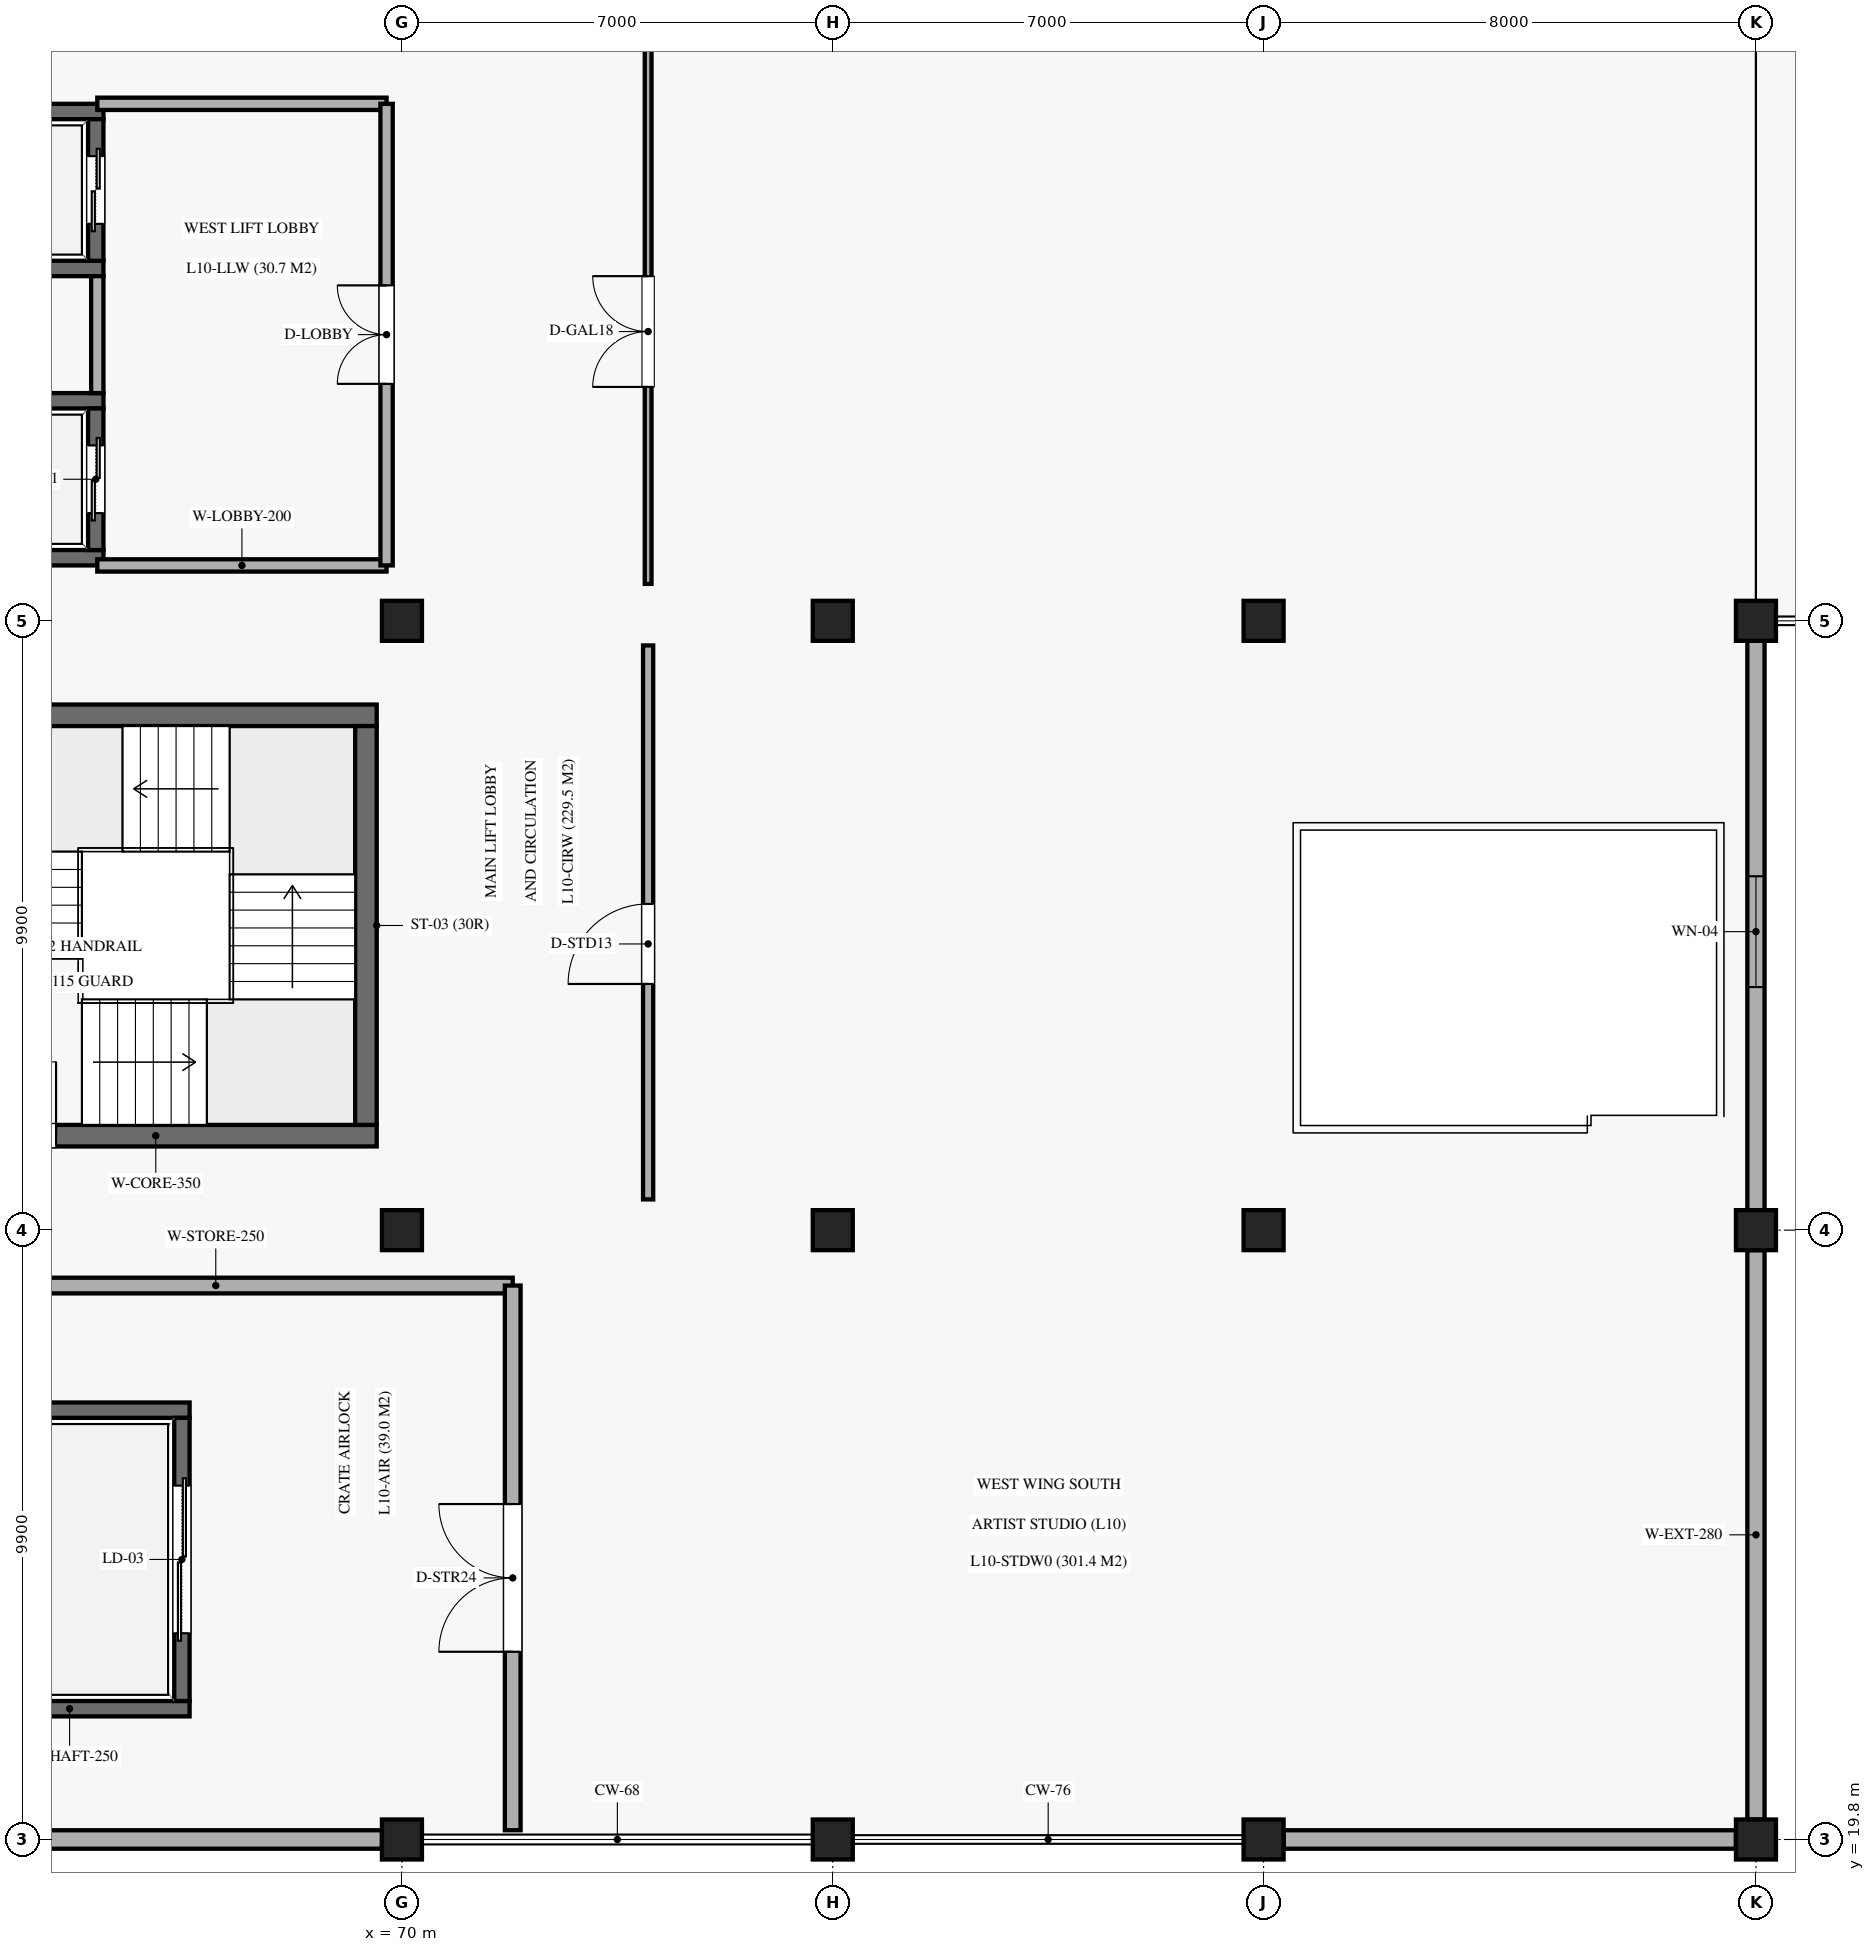
"""IFC4 building model, lengths in metres.
Left out: names, types, materials, properties, quantities, classifications, styles, units other than length and angle.
Written with IfcOpenShell. Run it as: python <this file> out.ifc"""

import sys

from ifc_helpers import new_model, si_unit, direction, frame, frame_2d, origin, origin_2d, place, context, subcontext, project, spatial, rectangle, extrude, element, fill, save


model = new_model("IFC4")
c1 = context("Model", 3, precision=1e-05, world=origin(), true_north=direction((0.0, 1.0)))
c2 = subcontext(c1, "Body", "Model", "MODEL_VIEW")
j1 = project(units=[si_unit("LENGTHUNIT", "METRE"), si_unit("PLANEANGLEUNIT", "RADIAN")], contexts=[c1])
p1 = place(None, origin())
s1 = spatial("IfcSite", under=j1, at=p1, CompositionType="ELEMENT")
p2 = place(p1, origin())
s2 = spatial("IfcBuilding", under=s1, at=p2, CompositionType="ELEMENT")
p3 = place(p2, frame((0.0, 0.0, 52.02)))
s3 = spatial("IfcBuildingStorey", under=s2, at=p3, CompositionType="ELEMENT", Elevation=52.02)
for number, where, z_axis, x_axis in (
    (1, (70.0, 19.8, 0.0), (0.0, 0.0, 1.0), (1.0, 0.0, 0.0)),
    (2, (70.0, 29.7, 0.0), (0.0, 0.0, 1.0), (1.0, 0.0, 0.0)),
    (3, (70.0, 39.6, 0.0), (0.0, 0.0, 1.0), (1.0, 0.0, 0.0)),
    (4, (77.0, 19.8, 0.0), (0.0, 0.0, 1.0), (1.0, 0.0, 0.0)),
    (5, (77.0, 29.7, 0.0), (0.0, 0.0, 1.0), (1.0, 0.0, 0.0)),
    (6, (77.0, 39.6, 0.0), (0.0, 0.0, 1.0), (1.0, 0.0, 0.0)),
    (7, (84.0, 19.8, 0.0), (0.0, 0.0, 1.0), (1.0, 0.0, 0.0)),
    (8, (84.0, 29.7, 0.0), (0.0, 0.0, 1.0), (1.0, 0.0, 0.0)),
    (9, (84.0, 39.6, 0.0), (0.0, 0.0, 1.0), (1.0, 0.0, 0.0)),
    (10, (92.0, 19.8, 0.0), (0.0, 0.0, 1.0), (1.0, 0.0, 0.0)),
    (11, (92.0, 29.7, 0.0), (0.0, 0.0, 1.0), (1.0, 0.0, 0.0)),
    (12, (92.0, 39.6, 0.0), (0.0, 0.0, 1.0), (1.0, 0.0, 0.0)),
):
    element("IfcColumn", number, at=place(p3, frame(where, z_axis=z_axis, x_axis=x_axis)), inside=s3, PredefinedType="COLUMN", context=c2, shape_type="SweptSolid", body=[
        extrude(rectangle(XDim=0.65, YDim=0.65, at=origin_2d()), origin(), (0.0, 0.0, 1.0), 5.1),
    ])
p4 = place(p3, frame((92.0, 20.125, 0.0), z_axis=(0.0, 0.0, 1.0), x_axis=(0.0, 1.0, 0.0)))
e13 = element("IfcWall", 13, at=p4, inside=s3, PredefinedType="SOLIDWALL", context=c2, shape_type="SweptSolid", body=[
    extrude(rectangle(XDim=9.25, YDim=0.28, at=frame_2d((4.625, 0.0))), origin(), (0.0, 0.0, 1.0), 4.1),
])
p5 = place(p3, frame((92.0, 30.025, 0.0), z_axis=(0.0, 0.0, 1.0), x_axis=(0.0, 1.0, 0.0)))
e14 = element("IfcWall", 14, at=p5, inside=s3, PredefinedType="SOLIDWALL", context=c2, shape_type="SweptSolid", body=[
    extrude(rectangle(XDim=9.25, YDim=0.28, at=frame_2d((4.625, 0.0))), origin(), (0.0, 0.0, 1.0), 4.1),
])
p6 = place(p5, frame((3.625, 0.0, 1.45)))
e15 = element("IfcOpeningElement", 15, at=p6, cuts=e14, PredefinedType="OPENING", context=c2, shape_type="SweptSolid", body=[
    extrude(rectangle(XDim=1.8, YDim=1.7, at=frame_2d((0.9, 0.85))), frame((0.0, 0.15, 0.0), z_axis=(0.0, -1.0, 0.0), x_axis=(1.0, 0.0, 0.0)), (0.0, 0.0, 1.0), 0.3),
])
for number, where, z_axis, x_axis in (
    (16, (62.325, 19.8, 0.0), (0.0, 0.0, 1.0), (1.0, 0.0, 0.0)),
    (17, (84.325, 19.8, 0.0), (0.0, 0.0, 1.0), (1.0, 0.0, 0.0)),
):
    element("IfcWall", number, at=place(p3, frame(where, z_axis=z_axis, x_axis=x_axis)), inside=s3, PredefinedType="SOLIDWALL", context=c2, shape_type="SweptSolid", body=[
        extrude(rectangle(XDim=7.35, YDim=0.3, at=frame_2d((3.675, 0.0))), origin(), (0.0, 0.0, 1.0), 4.1),
    ])
p7 = place(p3, frame((62.41, 31.235, 0.0), z_axis=(0.0, 0.0, 1.0), x_axis=(1.0, 0.0, 0.0)))
e18 = element("IfcWall", 18, at=p7, inside=s3, PredefinedType="SHEAR", context=c2, shape_type="SweptSolid", body=[
    extrude(rectangle(XDim=7.18, YDim=0.35, at=frame_2d((3.59, 0.0))), origin(), (0.0, 0.0, 1.0), 4.85),
])
p8 = place(p7, frame((0.77, 0.0, 0.0)))
e19 = element("IfcOpeningElement", 19, at=p8, cuts=e18, PredefinedType="OPENING", context=c2, shape_type="SweptSolid", body=[
    extrude(rectangle(XDim=1.2, YDim=2.2, at=frame_2d((0.6, 1.1))), frame((0.0, 0.185, 0.0), z_axis=(0.0, -1.0, 0.0), x_axis=(1.0, 0.0, 0.0)), (0.0, 0.0, 1.0), 0.37),
])
p9 = place(p3, frame((62.41, 38.065, 0.0), z_axis=(0.0, 0.0, 1.0), x_axis=(1.0, 0.0, 0.0)))
e20 = element("IfcWall", 20, at=p9, inside=s3, PredefinedType="SHEAR", context=c2, shape_type="SweptSolid", body=[
    extrude(rectangle(XDim=7.18, YDim=0.35, at=frame_2d((3.59, 0.0))), origin(), (0.0, 0.0, 1.0), 4.85),
])
p10 = place(p3, frame((69.415, 31.41, 0.0), z_axis=(0.0, 0.0, 1.0), x_axis=(0.0, 1.0, 0.0)))
e21 = element("IfcWall", 21, at=p10, inside=s3, PredefinedType="SHEAR", context=c2, shape_type="SweptSolid", body=[
    extrude(rectangle(XDim=6.48, YDim=0.35, at=frame_2d((3.24, 0.0))), origin(), (0.0, 0.0, 1.0), 4.85),
])
for number, where, z_axis, x_axis in (
    (22, (62.65, 40.625, 0.0), (0.0, 0.0, 1.0), (1.0, 0.0, 0.0)),
    (23, (62.65, 43.175, 0.0), (0.0, 0.0, 1.0), (1.0, 0.0, 0.0)),
):
    element("IfcWall", number, at=place(p3, frame(where, z_axis=z_axis, x_axis=x_axis)), inside=s3, PredefinedType="SOLIDWALL", context=c2, shape_type="SweptSolid", body=[
        extrude(rectangle(XDim=2.5, YDim=0.25, at=frame_2d((1.25, 0.0))), origin(), (0.0, 0.0, 1.0), 4.83),
    ])
p11 = place(p3, frame((65.025, 40.75, 0.0), z_axis=(0.0, 0.0, 1.0), x_axis=(0.0, 1.0, 0.0)))
e24 = element("IfcWall", 24, at=p11, inside=s3, PredefinedType="SOLIDWALL", context=c2, shape_type="SweptSolid", body=[
    extrude(rectangle(XDim=2.3, YDim=0.25, at=frame_2d((1.15, 0.0))), origin(), (0.0, 0.0, 1.0), 4.83),
])
p12 = place(p11, frame((0.6, 0.0, 0.0)))
e25 = element("IfcOpeningElement", 25, at=p12, cuts=e24, PredefinedType="OPENING", context=c2, shape_type="SweptSolid", body=[
    extrude(rectangle(XDim=1.1, YDim=2.2, at=frame_2d((0.55, 1.1))), frame((0.0, 0.135, 0.0), z_axis=(0.0, -1.0, 0.0), x_axis=(1.0, 0.0, 0.0)), (0.0, 0.0, 1.0), 0.27),
])
for number, where, z_axis, x_axis in (
    (26, (62.65, 45.325, 0.0), (0.0, 0.0, 1.0), (1.0, 0.0, 0.0)),
    (27, (62.65, 47.875, 0.0), (0.0, 0.0, 1.0), (1.0, 0.0, 0.0)),
):
    element("IfcWall", number, at=place(p3, frame(where, z_axis=z_axis, x_axis=x_axis)), inside=s3, PredefinedType="SOLIDWALL", context=c2, shape_type="SweptSolid", body=[
        extrude(rectangle(XDim=2.5, YDim=0.25, at=frame_2d((1.25, 0.0))), origin(), (0.0, 0.0, 1.0), 4.83),
    ])
p13 = place(p3, frame((65.025, 45.45, 0.0), z_axis=(0.0, 0.0, 1.0), x_axis=(0.0, 1.0, 0.0)))
e28 = element("IfcWall", 28, at=p13, inside=s3, PredefinedType="SOLIDWALL", context=c2, shape_type="SweptSolid", body=[
    extrude(rectangle(XDim=2.3, YDim=0.25, at=frame_2d((1.15, 0.0))), origin(), (0.0, 0.0, 1.0), 4.83),
])
p14 = place(p13, frame((0.6, 0.0, 0.0)))
e29 = element("IfcOpeningElement", 29, at=p14, cuts=e28, PredefinedType="OPENING", context=c2, shape_type="SweptSolid", body=[
    extrude(rectangle(XDim=1.1, YDim=2.2, at=frame_2d((0.55, 1.1))), frame((0.0, 0.135, 0.0), z_axis=(0.0, -1.0, 0.0), x_axis=(1.0, 0.0, 0.0)), (0.0, 0.0, 1.0), 0.27),
])
for number, where, z_axis, x_axis in (
    (30, (62.65, 21.925, 0.0), (0.0, 0.0, 1.0), (1.0, 0.0, 0.0)),
    (31, (62.65, 26.775, 0.0), (0.0, 0.0, 1.0), (1.0, 0.0, 0.0)),
):
    element("IfcWall", number, at=place(p3, frame(where, z_axis=z_axis, x_axis=x_axis)), inside=s3, PredefinedType="SOLIDWALL", context=c2, shape_type="SweptSolid", body=[
        extrude(rectangle(XDim=3.9, YDim=0.25, at=frame_2d((1.95, 0.0))), origin(), (0.0, 0.0, 1.0), 4.83),
    ])
p15 = place(p3, frame((66.425, 22.05, 0.0), z_axis=(0.0, 0.0, 1.0), x_axis=(0.0, 1.0, 0.0)))
e32 = element("IfcWall", 32, at=p15, inside=s3, PredefinedType="SOLIDWALL", context=c2, shape_type="SweptSolid", body=[
    extrude(rectangle(XDim=4.6, YDim=0.25, at=frame_2d((2.3, 0.0))), origin(), (0.0, 0.0, 1.0), 4.83),
])
p16 = place(p15, frame((1.1, 0.0, 0.0)))
e33 = element("IfcOpeningElement", 33, at=p16, cuts=e32, PredefinedType="OPENING", context=c2, shape_type="SweptSolid", body=[
    extrude(rectangle(XDim=2.4, YDim=2.65, at=frame_2d((1.2, 1.325))), frame((0.0, 0.135, 0.0), z_axis=(0.0, -1.0, 0.0), x_axis=(1.0, 0.0, 0.0)), (0.0, 0.0, 1.0), 0.27),
])
for number, where, z_axis, x_axis in (
    (34, (65.05, 40.5, 0.0), (0.0, 0.0, 1.0), (1.0, 0.0, 0.0)),
    (35, (65.05, 48.0, 0.0), (0.0, 0.0, 1.0), (1.0, 0.0, 0.0)),
):
    element("IfcWall", number, at=place(p3, frame(where, z_axis=z_axis, x_axis=x_axis)), inside=s3, PredefinedType="SOLIDWALL", context=c2, shape_type="SweptSolid", body=[
        extrude(rectangle(XDim=4.7, YDim=0.2, at=frame_2d((2.35, 0.0))), origin(), (0.0, 0.0, 1.0), 3.97),
    ])
p17 = place(p3, frame((65.05, 43.3, 0.0), z_axis=(0.0, 0.0, 1.0), x_axis=(0.0, 1.0, 0.0)))
e36 = element("IfcWall", 36, at=p17, inside=s3, PredefinedType="SOLIDWALL", context=c2, shape_type="SweptSolid", body=[
    extrude(rectangle(XDim=1.9, YDim=0.2, at=frame_2d((0.95, 0.0))), origin(), (0.0, 0.0, 1.0), 3.97),
])
p18 = place(p3, frame((69.75, 40.5, 0.0), z_axis=(0.0, 0.0, 1.0), x_axis=(0.0, 1.0, 0.0)))
e37 = element("IfcWall", 37, at=p18, inside=s3, PredefinedType="SOLIDWALL", context=c2, shape_type="SweptSolid", body=[
    extrude(rectangle(XDim=7.5, YDim=0.2, at=frame_2d((3.75, 0.0))), origin(), (0.0, 0.0, 1.0), 3.97),
])
p19 = place(p18, frame((2.95, 0.0, 0.0)))
e38 = element("IfcOpeningElement", 38, at=p19, cuts=e37, PredefinedType="OPENING", context=c2, shape_type="SweptSolid", body=[
    extrude(rectangle(XDim=1.6, YDim=2.2, at=frame_2d((0.8, 1.1))), frame((0.0, 0.11, 0.0), z_axis=(0.0, -1.0, 0.0), x_axis=(1.0, 0.0, 0.0)), (0.0, 0.0, 1.0), 0.22),
])
p20 = place(p3, frame((62.15, 28.8, 0.0), z_axis=(0.0, 0.0, 1.0), x_axis=(1.0, 0.0, 0.0)))
e39 = element("IfcWall", 39, at=p20, inside=s3, PredefinedType="SOLIDWALL", context=c2, shape_type="SweptSolid", body=[
    extrude(rectangle(XDim=9.65, YDim=0.255, at=frame_2d((4.825, 0.0))), origin(), (0.0, 0.0, 1.0), 3.97),
])
p21 = place(p3, frame((71.8, 19.95, 0.0), z_axis=(0.0, 0.0, 1.0), x_axis=(0.0, 1.0, 0.0)))
e40 = element("IfcWall", 40, at=p21, inside=s3, PredefinedType="SOLIDWALL", context=c2, shape_type="SweptSolid", body=[
    extrude(rectangle(XDim=8.85, YDim=0.255, at=frame_2d((4.425, 0.0))), origin(), (0.0, 0.0, 1.0), 3.97),
])
p22 = place(p21, frame((2.9, 0.0, 0.0)))
e41 = element("IfcOpeningElement", 41, at=p22, cuts=e40, PredefinedType="OPENING", context=c2, shape_type="SweptSolid", body=[
    extrude(rectangle(XDim=2.4, YDim=2.5, at=frame_2d((1.2, 1.25))), frame((0.0, 0.137, 0.0), z_axis=(0.0, -1.0, 0.0), x_axis=(1.0, 0.0, 0.0)), (0.0, 0.0, 1.0), 0.275),
])
p23 = place(p3, frame((74.0, 40.2, 0.0), z_axis=(0.0, 0.0, 1.0), x_axis=(0.0, 1.0, 0.0)))
e42 = element("IfcWall", 42, at=p23, inside=s3, PredefinedType="PARTITIONING", context=c2, shape_type="SweptSolid", body=[
    extrude(rectangle(XDim=22.3, YDim=0.11, at=frame_2d((11.15, 0.0))), origin(), (0.0, 0.0, 1.0), 3.97),
])
p24 = place(p23, frame((3.2, 0.0, 0.0)))
e43 = element("IfcOpeningElement", 43, at=p24, cuts=e42, PredefinedType="OPENING", context=c2, shape_type="SweptSolid", body=[
    extrude(rectangle(XDim=1.8, YDim=2.45, at=frame_2d((0.9, 1.225))), frame((0.0, 0.065, 0.0), z_axis=(0.0, -1.0, 0.0), x_axis=(1.0, 0.0, 0.0)), (0.0, 0.0, 1.0), 0.13),
])
p25 = place(p3, frame((74.0, 30.2, 0.0), z_axis=(0.0, 0.0, 1.0), x_axis=(0.0, 1.0, 0.0)))
e44 = element("IfcWall", 44, at=p25, inside=s3, PredefinedType="PARTITIONING", context=c2, shape_type="SweptSolid", body=[
    extrude(rectangle(XDim=9.0, YDim=0.165, at=frame_2d((4.5, 0.0))), origin(), (0.0, 0.0, 1.0), 3.97),
])
p26 = place(p25, frame((3.5, 0.0, 0.0)))
e45 = element("IfcOpeningElement", 45, at=p26, cuts=e44, PredefinedType="OPENING", context=c2, shape_type="SweptSolid", body=[
    extrude(rectangle(XDim=1.3, YDim=2.25, at=frame_2d((0.65, 1.125))), frame((0.0, 0.093, 0.0), z_axis=(0.0, -1.0, 0.0), x_axis=(1.0, 0.0, 0.0)), (0.0, 0.0, 1.0), 0.185),
])
p27 = place(p6, origin())
e46 = element("IfcWindow", 46, at=p27, inside=s3, PartitioningType="SINGLE_PANEL", PredefinedType="WINDOW", context=c2, shape_type="SweptSolid", body=[
    extrude(rectangle(XDim=1.8, YDim=1.7, at=frame_2d((0.9, 0.85))), frame((0.0, 0.03, 0.0), z_axis=(0.0, -1.0, 0.0), x_axis=(1.0, 0.0, 0.0)), (0.0, 0.0, 1.0), 0.06),
])
fill(e15, e46)
p28 = place(p8, origin())
e47 = element("IfcDoor", 47, at=p28, inside=s3, OperationType="SINGLE_SWING_RIGHT", PredefinedType="DOOR", context=c2, shape_type="SweptSolid", body=[
    extrude(rectangle(XDim=1.2, YDim=2.2, at=frame_2d((0.6, 1.1))), frame((0.0, 0.025, 0.0), z_axis=(0.0, -1.0, 0.0), x_axis=(1.0, 0.0, 0.0)), (0.0, 0.0, 1.0), 0.05),
])
fill(e19, e47)
p29 = place(p12, origin())
e48 = element("IfcDoor", 48, at=p29, inside=s3, OperationType="DOUBLE_DOOR_SLIDING", PredefinedType="DOOR", context=c2, shape_type="SweptSolid", body=[
    extrude(rectangle(XDim=1.1, YDim=2.2, at=frame_2d((0.55, 1.1))), frame((0.0, 0.025, 0.0), z_axis=(0.0, -1.0, 0.0), x_axis=(1.0, 0.0, 0.0)), (0.0, 0.0, 1.0), 0.05),
])
fill(e25, e48)
p30 = place(p14, origin())
e49 = element("IfcDoor", 49, at=p30, inside=s3, OperationType="DOUBLE_DOOR_SLIDING", PredefinedType="DOOR", context=c2, shape_type="SweptSolid", body=[
    extrude(rectangle(XDim=1.1, YDim=2.2, at=frame_2d((0.55, 1.1))), frame((0.0, 0.025, 0.0), z_axis=(0.0, -1.0, 0.0), x_axis=(1.0, 0.0, 0.0)), (0.0, 0.0, 1.0), 0.05),
])
fill(e29, e49)
p31 = place(p16, origin())
e50 = element("IfcDoor", 50, at=p31, inside=s3, OperationType="DOUBLE_DOOR_SLIDING", PredefinedType="DOOR", context=c2, shape_type="SweptSolid", body=[
    extrude(rectangle(XDim=2.4, YDim=2.65, at=frame_2d((1.2, 1.325))), frame((0.0, 0.025, 0.0), z_axis=(0.0, -1.0, 0.0), x_axis=(1.0, 0.0, 0.0)), (0.0, 0.0, 1.0), 0.05),
])
fill(e33, e50)
p32 = place(p19, origin())
e51 = element("IfcDoor", 51, at=p32, inside=s3, OperationType="DOUBLE_DOOR_SINGLE_SWING", PredefinedType="DOOR", context=c2, shape_type="SweptSolid", body=[
    extrude(rectangle(XDim=1.6, YDim=2.2, at=frame_2d((0.8, 1.1))), frame((0.0, 0.025, 0.0), z_axis=(0.0, -1.0, 0.0), x_axis=(1.0, 0.0, 0.0)), (0.0, 0.0, 1.0), 0.05),
])
fill(e38, e51)
p33 = place(p22, origin())
e52 = element("IfcDoor", 52, at=p33, inside=s3, OperationType="DOUBLE_DOOR_SINGLE_SWING", PredefinedType="DOOR", context=c2, shape_type="SweptSolid", body=[
    extrude(rectangle(XDim=2.4, YDim=2.5, at=frame_2d((1.2, 1.25))), frame((0.0, 0.025, 0.0), z_axis=(0.0, -1.0, 0.0), x_axis=(1.0, 0.0, 0.0)), (0.0, 0.0, 1.0), 0.05),
])
fill(e41, e52)
p34 = place(p24, origin())
e53 = element("IfcDoor", 53, at=p34, inside=s3, OperationType="DOUBLE_DOOR_SINGLE_SWING", PredefinedType="DOOR", context=c2, shape_type="SweptSolid", body=[
    extrude(rectangle(XDim=1.8, YDim=2.45, at=frame_2d((0.9, 1.225))), frame((0.0, 0.025, 0.0), z_axis=(0.0, -1.0, 0.0), x_axis=(1.0, 0.0, 0.0)), (0.0, 0.0, 1.0), 0.05),
])
fill(e43, e53)
p35 = place(p26, origin())
e54 = element("IfcDoor", 54, at=p35, inside=s3, OperationType="SINGLE_SWING_LEFT", PredefinedType="DOOR", context=c2, shape_type="SweptSolid", body=[
    extrude(rectangle(XDim=1.3, YDim=2.25, at=frame_2d((0.65, 1.125))), frame((0.0, 0.025, 0.0), z_axis=(0.0, -1.0, 0.0), x_axis=(1.0, 0.0, 0.0)), (0.0, 0.0, 1.0), 0.05),
])
fill(e45, e54)
save(model, sys.argv[1])
